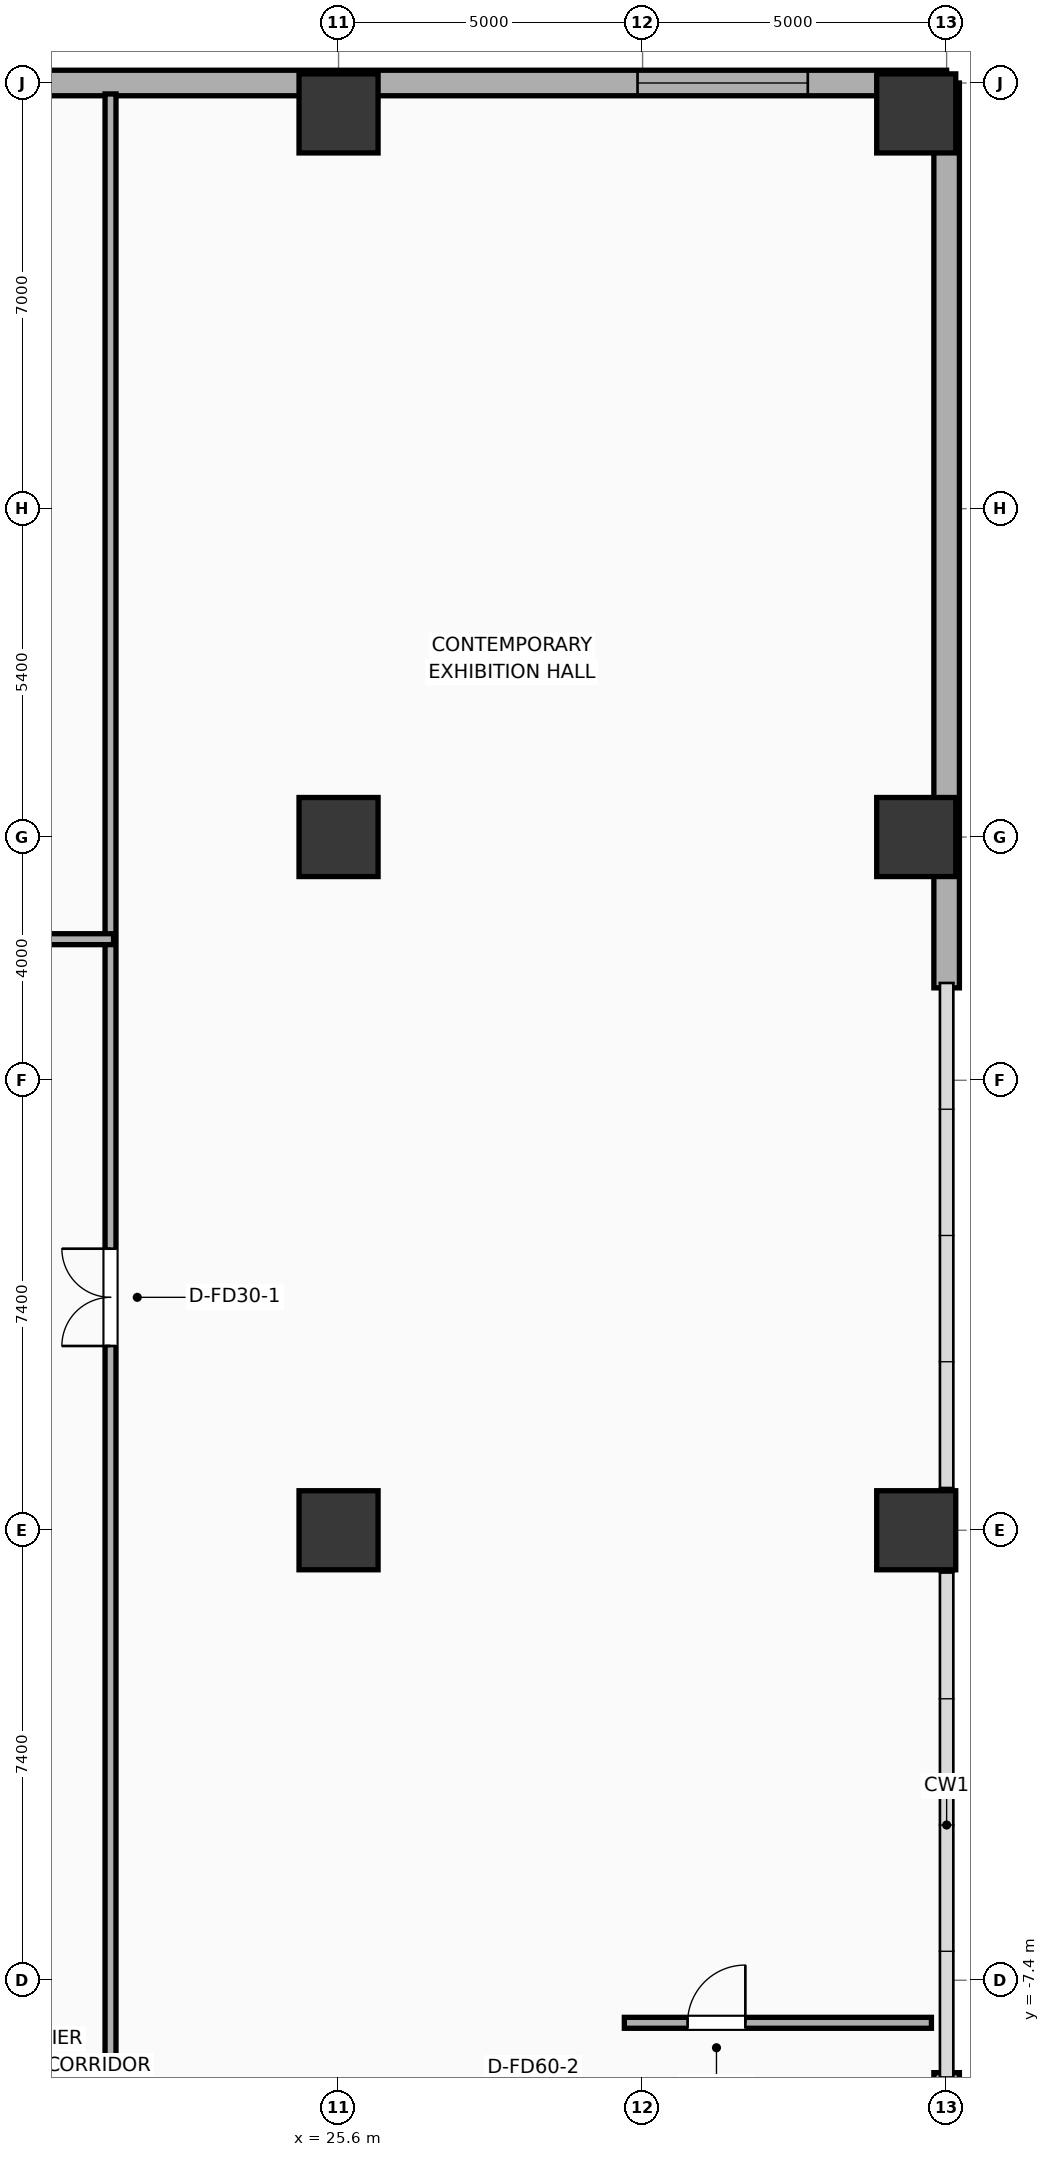
"""IFC4 building model, lengths in metres.
Left out: names, types, materials, properties, quantities, classifications, styles, units other than length and angle.
Written with IfcOpenShell. Run it as: python <this file> out.ifc"""

import sys

from ifc_helpers import new_model, si_unit, direction, frame, frame_2d, origin, origin_2d, place, context, subcontext, project, spatial, rectangle, extrude, element, fill, save


model = new_model("IFC4")
c1 = context("Model", 3, precision=1e-05, world=origin(), true_north=direction((0.0, 1.0)))
c2 = subcontext(c1, "Body", "Model", "MODEL_VIEW")
j1 = project(units=[si_unit("LENGTHUNIT", "METRE"), si_unit("PLANEANGLEUNIT", "RADIAN")], contexts=[c1])
p1 = place(None, origin())
s1 = spatial("IfcSite", under=j1, at=p1, CompositionType="ELEMENT")
p2 = place(p1, origin())
s2 = spatial("IfcBuilding", under=s1, at=p2, CompositionType="ELEMENT")
p3 = place(p2, frame((0.0, 0.0, 5.2)))
s3 = spatial("IfcBuildingStorey", under=s2, at=p3, CompositionType="ELEMENT", Elevation=5.2)
for number, where, z_axis, x_axis in (
    (1, (25.6, 0.0, 0.0), (0.0, 0.0, 1.0), (1.0, 0.0, 0.0)),
    (2, (25.6, 11.4, 0.0), (0.0, 0.0, 1.0), (1.0, 0.0, 0.0)),
    (3, (25.6, 23.3, 0.0), (0.0, 0.0, 1.0), (1.0, 0.0, 0.0)),
    (4, (35.1, 0.0, 0.0), (0.0, 0.0, 1.0), (1.0, 0.0, 0.0)),
    (5, (35.1, 11.4, 0.0), (0.0, 0.0, 1.0), (1.0, 0.0, 0.0)),
    (6, (35.1, 23.3, 0.0), (0.0, 0.0, 1.0), (1.0, 0.0, 0.0)),
):
    element("IfcColumn", number, at=place(p3, frame(where, z_axis=z_axis, x_axis=x_axis)), inside=s3, PredefinedType="COLUMN", context=c2, shape_type="SweptSolid", body=[
        extrude(rectangle(XDim=1.3, YDim=1.3, at=origin_2d()), origin(), (0.0, 0.0, 1.0), 5.2),
    ])
for number, where, z_axis, x_axis in (
    (7, (35.6, -23.8, 0.0), (0.0, 0.0, 1.0), (0.0, 1.0, 0.0)),
    (8, (35.6, 8.92, 0.0), (0.0, 0.0, 1.0), (0.0, 1.0, 0.0)),
):
    element("IfcWall", number, at=place(p3, frame(where, z_axis=z_axis, x_axis=x_axis)), inside=s3, PredefinedType="ELEMENTEDWALL", context=c2, shape_type="SweptSolid", body=[
        extrude(rectangle(XDim=14.88, YDim=0.42, at=frame_2d((7.44, 0.0))), origin(), (0.0, 0.0, 1.0), 4.92),
    ])
p4 = place(p3, frame((35.6, 23.8, 0.0), z_axis=(0.0, 0.0, 1.0), x_axis=(-1.0, 0.0, 0.0)))
e9 = element("IfcWall", 9, at=p4, inside=s3, PredefinedType="ELEMENTEDWALL", context=c2, shape_type="SweptSolid", body=[
    extrude(rectangle(XDim=22.1, YDim=0.42, at=frame_2d((11.05, 0.0))), origin(), (0.0, 0.0, 1.0), 4.92),
])
p5 = place(p4, frame((2.283, 0.0, 0.65)))
e10 = element("IfcOpeningElement", 10, at=p5, cuts=e9, PredefinedType="OPENING", context=c2, shape_type="SweptSolid", body=[
    extrude(rectangle(XDim=2.8, YDim=2.6, at=frame_2d((1.4, 1.3))), frame((0.0, 0.22, 0.0), z_axis=(0.0, -1.0, 0.0), x_axis=(1.0, 0.0, 0.0)), (0.0, 0.0, 1.0), 0.44),
])
p6 = place(p4, frame((17.017, 0.0, 0.65)))
e11 = element("IfcOpeningElement", 11, at=p6, cuts=e9, PredefinedType="OPENING", context=c2, shape_type="SweptSolid", body=[
    extrude(rectangle(XDim=2.8, YDim=2.6, at=frame_2d((1.4, 1.3))), frame((0.0, 0.22, 0.0), z_axis=(0.0, -1.0, 0.0), x_axis=(1.0, 0.0, 0.0)), (0.0, 0.0, 1.0), 0.44),
])
p7 = place(p3, frame((21.85, -10.5, 0.0), z_axis=(0.0, 0.0, 1.0), x_axis=(0.0, 1.0, 0.0)))
e12 = element("IfcWall", 12, at=p7, inside=s3, PredefinedType="PARTITIONING", context=c2, shape_type="SweptSolid", body=[
    extrude(rectangle(XDim=34.12, YDim=0.18, at=frame_2d((17.06, 0.0))), origin(), (0.0, 0.0, 1.0), 4.92),
])
p8 = place(p7, frame((13.531, 0.0, 0.0)))
e13 = element("IfcOpeningElement", 13, at=p8, cuts=e12, PredefinedType="OPENING", context=c2, shape_type="SweptSolid", body=[
    extrude(rectangle(XDim=1.6, YDim=2.05, at=frame_2d((0.8, 1.025))), frame((0.0, 0.1, 0.0), z_axis=(0.0, -1.0, 0.0), x_axis=(1.0, 0.0, 0.0)), (0.0, 0.0, 1.0), 0.2),
])
p9 = place(p3, frame((30.3, -8.1, 0.0), z_axis=(0.0, 0.0, 1.0), x_axis=(1.0, 0.0, 0.0)))
e14 = element("IfcWall", 14, at=p9, inside=s3, PredefinedType="PARTITIONING", context=c2, shape_type="SweptSolid", body=[
    extrude(rectangle(XDim=5.05, YDim=0.18, at=frame_2d((2.525, 0.0))), origin(), (0.0, 0.0, 1.0), 4.92),
])
p10 = place(p9, frame((1.04, 0.0, 0.0)))
e15 = element("IfcOpeningElement", 15, at=p10, cuts=e14, PredefinedType="OPENING", context=c2, shape_type="SweptSolid", body=[
    extrude(rectangle(XDim=0.95, YDim=2.05, at=frame_2d((0.475, 1.025))), frame((0.0, 0.1, 0.0), z_axis=(0.0, -1.0, 0.0), x_axis=(1.0, 0.0, 0.0)), (0.0, 0.0, 1.0), 0.2),
])
p11 = place(p3, frame((13.52, 9.72, 0.0), z_axis=(0.0, 0.0, 1.0), x_axis=(1.0, 0.0, 0.0)))
e16 = element("IfcWall", 16, at=p11, inside=s3, PredefinedType="PARTITIONING", context=c2, shape_type="SweptSolid", body=[
    extrude(rectangle(XDim=8.38, YDim=0.18, at=frame_2d((4.19, 0.0))), origin(), (0.0, 0.0, 1.0), 4.92),
])
p12 = place(p11, frame((3.39, 0.0, 0.0)))
e17 = element("IfcOpeningElement", 17, at=p12, cuts=e16, PredefinedType="OPENING", context=c2, shape_type="SweptSolid", body=[
    extrude(rectangle(XDim=1.6, YDim=2.05, at=frame_2d((0.8, 1.025))), frame((0.0, 0.1, 0.0), z_axis=(0.0, -1.0, 0.0), x_axis=(1.0, 0.0, 0.0)), (0.0, 0.0, 1.0), 0.2),
])
p13 = place(p5, origin())
e18 = element("IfcWindow", 18, at=p13, inside=s3, PartitioningType="SINGLE_PANEL", PredefinedType="WINDOW", context=c2, shape_type="SweptSolid", body=[
    extrude(rectangle(XDim=2.8, YDim=2.6, at=frame_2d((1.4, 1.3))), frame((0.0, 0.03, 0.0), z_axis=(0.0, -1.0, 0.0), x_axis=(1.0, 0.0, 0.0)), (0.0, 0.0, 1.0), 0.06),
])
fill(e10, e18)
p14 = place(p8, origin())
e19 = element("IfcDoor", 19, at=p14, inside=s3, OperationType="DOUBLE_DOOR_SINGLE_SWING", PredefinedType="DOOR", context=c2, shape_type="SweptSolid", body=[
    extrude(rectangle(XDim=1.6, YDim=2.05, at=frame_2d((0.8, 1.025))), frame((0.0, 0.025, 0.0), z_axis=(0.0, -1.0, 0.0), x_axis=(1.0, 0.0, 0.0)), (0.0, 0.0, 1.0), 0.05),
])
fill(e13, e19)
p15 = place(p10, origin())
e20 = element("IfcDoor", 20, at=p15, inside=s3, OperationType="SINGLE_SWING_RIGHT", PredefinedType="DOOR", context=c2, shape_type="SweptSolid", body=[
    extrude(rectangle(XDim=0.95, YDim=2.05, at=frame_2d((0.475, 1.025))), frame((0.0, 0.025, 0.0), z_axis=(0.0, -1.0, 0.0), x_axis=(1.0, 0.0, 0.0)), (0.0, 0.0, 1.0), 0.05),
])
fill(e15, e20)
save(model, sys.argv[1])
